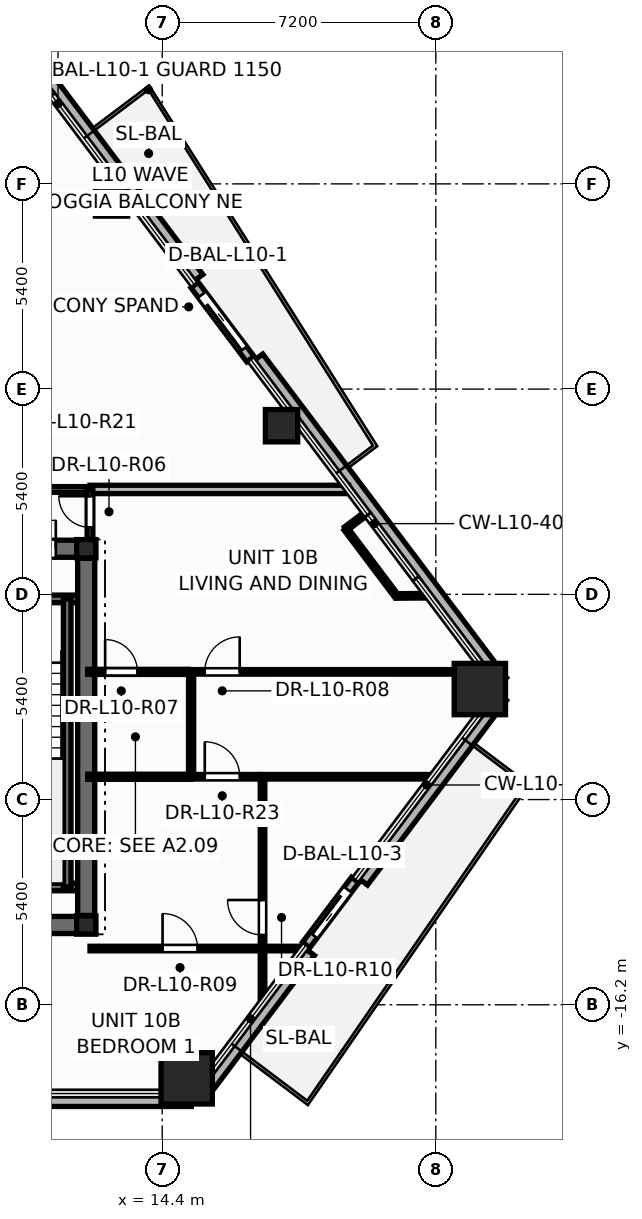
"""IFC4 building model, lengths in metres.
Left out: names, types, materials, properties, quantities, classifications, styles, units other than length and angle.
Written with IfcOpenShell. Run it as: python <this file> out.ifc"""

import sys

from ifc_helpers import new_model, si_unit, direction, frame, frame_2d, origin, origin_2d, place, context, subcontext, project, spatial, rectangle, hollow_rectangle, hollow_circle, i_section, extrude, element, fill, save


model = new_model("IFC4")
c1 = context("Model", 3, precision=1e-05, world=origin(), true_north=direction((0.0, 1.0)))
c2 = subcontext(c1, "Body", "Model", "MODEL_VIEW")
j1 = project(units=[si_unit("LENGTHUNIT", "METRE"), si_unit("PLANEANGLEUNIT", "RADIAN")], contexts=[c1])
p1 = place(None, origin())
s1 = spatial("IfcSite", under=j1, at=p1, CompositionType="ELEMENT")
p2 = place(p1, origin())
s2 = spatial("IfcBuilding", under=s1, at=p2, CompositionType="ELEMENT")
p3 = place(p2, frame((0.0, 0.0, 42.3)))
s3 = spatial("IfcBuildingStorey", under=s2, at=p3, CompositionType="ELEMENT", Elevation=42.3)
for number, where, z_axis, x_axis in (
    (1, (15.044, -18.135, 0.0), (0.0, 0.0, 1.0), (1.0, 0.0, 0.0)),
    (2, (22.759, -7.892, 0.0), (0.0, 0.0, 1.0), (1.0, 0.0, 0.0)),
):
    element("IfcColumn", number, at=place(p3, frame(where, z_axis=z_axis, x_axis=x_axis)), inside=s3, PredefinedType="COLUMN", context=c2, shape_type="SweptSolid", body=[
        extrude(hollow_rectangle(XDim=1.35, YDim=1.35, WallThickness=0.065, at=origin_2d()), origin(), (0.0, 0.0, 1.0), 3.6),
    ])
for number, where, z_axis, x_axis in (
    (3, (17.54, -0.963, 0.0), (0.0, 0.0, 1.0), (1.0, 0.0, 0.0)),
    (4, (13.066, 4.976, 0.0), (0.0, 0.0, 1.0), (1.0, 0.0, 0.0)),
):
    element("IfcColumn", number, at=place(p3, frame(where, z_axis=z_axis, x_axis=x_axis)), inside=s3, PredefinedType="COLUMN", context=c2, shape_type="SweptSolid", body=[
        extrude(hollow_circle(Radius=0.425, WallThickness=0.038, at=origin_2d()), origin(), (0.0, 0.0, 1.0), 3.6),
    ])
for number, where, z_axis, x_axis in (
    (5, (12.4, -14.1, 0.0), (0.0, 0.0, 1.0), (1.0, 0.0, 0.0)),
    (6, (12.4, -4.2, 0.0), (0.0, 0.0, 1.0), (1.0, 0.0, 0.0)),
):
    element("IfcColumn", number, at=place(p3, frame(where, z_axis=z_axis, x_axis=x_axis)), inside=s3, PredefinedType="COLUMN", context=c2, shape_type="SweptSolid", body=[
        extrude(i_section(OverallWidth=0.5, OverallDepth=0.482, WebThickness=0.04, FlangeThickness=0.045, at=origin_2d()), origin(), (0.0, 0.0, 1.0), 3.6),
    ])
p4 = place(p3, frame((-15.163, -18.696, -0.2), z_axis=(0.0, 0.0, 1.0), x_axis=(1.0, 0.0, 0.0)))
e7 = element("IfcWall", 7, at=p4, inside=s3, PredefinedType="PARAPET", context=c2, shape_type="SweptSolid", body=[
    extrude(rectangle(XDim=30.327, YDim=0.36, at=frame_2d((15.163, 0.0))), origin(), (0.0, 0.0, 1.0), 0.38),
])
p5 = place(p3, frame((15.443, -18.536, -0.2), z_axis=(0.0, 0.0, 1.0), x_axis=(0.601658024361, 0.798753792931, 0.0)))
e8 = element("IfcWall", 8, at=p5, inside=s3, PredefinedType="PARAPET", context=c2, shape_type="SweptSolid", body=[
    extrude(rectangle(XDim=4.685, YDim=0.36, at=frame_2d((2.342, 0.0))), origin(), (0.0, 0.0, 1.0), 0.38),
])
p6 = place(p3, frame((19.658, -12.941, -0.2), z_axis=(0.0, 0.0, 1.0), x_axis=(0.601637160859, 0.798769507852, 0.0)))
e9 = element("IfcWall", 9, at=p6, inside=s3, PredefinedType="PARAPET", context=c2, shape_type="SweptSolid", body=[
    extrude(rectangle(XDim=6.08, YDim=0.36, at=frame_2d((3.04, 0.0))), origin(), (0.0, 0.0, 1.0), 0.38),
])
p7 = place(p3, frame((23.315, -7.7, -0.2), z_axis=(0.0, 0.0, 1.0), x_axis=(-0.601640427837, 0.798767047137, 0.0)))
e10 = element("IfcWall", 10, at=p7, inside=s3, PredefinedType="PARAPET", context=c2, shape_type="SweptSolid", body=[
    extrude(rectangle(XDim=10.66, YDim=0.36, at=frame_2d((5.33, 0.0))), origin(), (0.0, 0.0, 1.0), 0.38),
])
p8 = place(p3, frame((15.326, 2.907, -0.2), z_axis=(0.0, 0.0, 1.0), x_axis=(-0.601625447282, 0.798778330441, 0.0)))
e11 = element("IfcWall", 11, at=p8, inside=s3, PredefinedType="PARAPET", context=c2, shape_type="SweptSolid", body=[
    extrude(rectangle(XDim=11.767, YDim=0.36, at=frame_2d((5.883, 0.0))), origin(), (0.0, 0.0, 1.0), 0.38),
])
p9 = place(p3, frame((16.72, 0.79, -0.015), z_axis=(0.0, 0.0, 1.0), x_axis=(-0.601647678338, 0.798761585926, 0.0)))
e12 = element("IfcWall", 12, at=p9, inside=s3, PredefinedType="STANDARD", context=c2, shape_type="SweptSolid", body=[
    extrude(rectangle(XDim=2.44, YDim=0.24, at=frame_2d((1.22, 0.0))), origin(), (0.0, 0.0, 1.0), 2.729),
])
p10 = place(p9, frame((0.32, 0.0, 0.015)))
e13 = element("IfcOpeningElement", 13, at=p10, cuts=e12, PredefinedType="OPENING", context=c2, shape_type="SweptSolid", body=[
    extrude(rectangle(XDim=1.806, YDim=2.204, at=frame_2d((0.9, 1.102))), frame((0.0, 0.13, 0.0), z_axis=(0.0, -1.0, 0.0), x_axis=(1.0, 0.0, 0.0)), (0.0, 0.0, 1.0), 0.26),
])
p11 = place(p3, frame((18.188, -14.626, -0.015), z_axis=(0.0, 0.0, 1.0), x_axis=(0.601623476904, 0.79877981449, 0.0)))
e14 = element("IfcWall", 14, at=p11, inside=s3, PredefinedType="STANDARD", context=c2, shape_type="SweptSolid", body=[
    extrude(rectangle(XDim=2.14, YDim=0.24, at=frame_2d((1.07, 0.0))), origin(), (0.0, 0.0, 1.0), 2.729),
])
p12 = place(p11, frame((0.32, 0.0, 0.015)))
e15 = element("IfcOpeningElement", 15, at=p12, cuts=e14, PredefinedType="OPENING", context=c2, shape_type="SweptSolid", body=[
    extrude(rectangle(XDim=1.506, YDim=2.204, at=frame_2d((0.75, 1.102))), frame((0.0, 0.13, 0.0), z_axis=(0.0, -1.0, 0.0), x_axis=(1.0, 0.0, 0.0)), (0.0, 0.0, 1.0), 0.26),
])
p13 = place(p3, frame((-12.65, -14.1, 0.0), z_axis=(0.0, 0.0, 1.0), x_axis=(1.0, 0.0, 0.0)))
e16 = element("IfcWall", 16, at=p13, inside=s3, PredefinedType="SHEAR", context=c2, shape_type="SweptSolid", body=[
    extrude(rectangle(XDim=25.3, YDim=0.45, at=frame_2d((12.65, 0.0))), origin(), (0.0, 0.0, 1.0), 3.6),
])
p14 = place(p3, frame((-12.65, -4.2, 0.0), z_axis=(0.0, 0.0, 1.0), x_axis=(1.0, 0.0, 0.0)))
e17 = element("IfcWall", 17, at=p14, inside=s3, PredefinedType="SHEAR", context=c2, shape_type="SweptSolid", body=[
    extrude(rectangle(XDim=25.3, YDim=0.45, at=frame_2d((12.65, 0.0))), origin(), (0.0, 0.0, 1.0), 3.6),
])
p15 = place(p14, frame((1.85, 0.0, 0.0)))
e18 = element("IfcOpeningElement", 18, at=p15, cuts=e17, PredefinedType="OPENING", context=c2, shape_type="SweptSolid", body=[
    extrude(rectangle(XDim=0.756, YDim=2.054, at=frame_2d((0.375, 1.027))), frame((0.0, 0.235, 0.0), z_axis=(0.0, -1.0, 0.0), x_axis=(1.0, 0.0, 0.0)), (0.0, 0.0, 1.0), 0.47),
])
p16 = place(p14, frame((21.85, 0.0, 0.0)))
e19 = element("IfcOpeningElement", 19, at=p16, cuts=e17, PredefinedType="OPENING", context=c2, shape_type="SweptSolid", body=[
    extrude(rectangle(XDim=0.756, YDim=2.054, at=frame_2d((0.375, 1.027))), frame((0.0, 0.235, 0.0), z_axis=(0.0, -1.0, 0.0), x_axis=(1.0, 0.0, 0.0)), (0.0, 0.0, 1.0), 0.47),
])
p17 = place(p14, frame((23.5, 0.0, 0.0)))
e20 = element("IfcOpeningElement", 20, at=p17, cuts=e17, PredefinedType="OPENING", context=c2, shape_type="SweptSolid", body=[
    extrude(rectangle(XDim=0.756, YDim=2.054, at=frame_2d((0.375, 1.027))), frame((0.0, 0.235, 0.0), z_axis=(0.0, -1.0, 0.0), x_axis=(1.0, 0.0, 0.0)), (0.0, 0.0, 1.0), 0.47),
])
p18 = place(p14, frame((5.85, 0.0, 0.0)))
e21 = element("IfcOpeningElement", 21, at=p18, cuts=e17, PredefinedType="OPENING", context=c2, shape_type="SweptSolid", body=[
    extrude(rectangle(XDim=1.006, YDim=2.104, at=frame_2d((0.5, 1.052))), frame((0.0, 0.235, 0.0), z_axis=(0.0, -1.0, 0.0), x_axis=(1.0, 0.0, 0.0)), (0.0, 0.0, 1.0), 0.47),
])
p19 = place(p14, frame((10.35, 0.0, 0.0)))
e22 = element("IfcOpeningElement", 22, at=p19, cuts=e17, PredefinedType="OPENING", context=c2, shape_type="SweptSolid", body=[
    extrude(rectangle(XDim=1.406, YDim=2.154, at=frame_2d((0.7, 1.077))), frame((0.0, 0.235, 0.0), z_axis=(0.0, -1.0, 0.0), x_axis=(1.0, 0.0, 0.0)), (0.0, 0.0, 1.0), 0.47),
])
p20 = place(p14, frame((18.45, 0.0, 0.0)))
e23 = element("IfcOpeningElement", 23, at=p20, cuts=e17, PredefinedType="OPENING", context=c2, shape_type="SweptSolid", body=[
    extrude(rectangle(XDim=1.006, YDim=2.104, at=frame_2d((0.5, 1.052))), frame((0.0, 0.235, 0.0), z_axis=(0.0, -1.0, 0.0), x_axis=(1.0, 0.0, 0.0)), (0.0, 0.0, 1.0), 0.47),
])
for number, where, z_axis, x_axis in (
    (24, (8.48, -5.52, 0.0), (0.0, 0.0, 1.0), (1.0, 0.0, 0.0)),
    (25, (8.48, -13.1, 0.0), (0.0, 0.0, 1.0), (1.0, 0.0, 0.0)),
):
    element("IfcWall", number, at=place(p3, frame(where, z_axis=z_axis, x_axis=x_axis)), inside=s3, PredefinedType="SOLIDWALL", context=c2, shape_type="SweptSolid", body=[
        extrude(rectangle(XDim=3.87, YDim=0.2, at=frame_2d((1.935, 0.0))), origin(), (0.0, 0.0, 1.0), 3.6),
    ])
p21 = place(p3, frame((11.9, -13.1, 0.0), z_axis=(0.0, 0.0, 1.0), x_axis=(0.0, 1.0, 0.0)))
e26 = element("IfcWall", 26, at=p21, inside=s3, PredefinedType="SOLIDWALL", context=c2, shape_type="SweptSolid", body=[
    extrude(rectangle(XDim=7.58, YDim=0.2, at=frame_2d((3.79, 0.0))), origin(), (0.0, 0.0, 1.0), 3.6),
])
p22 = place(p3, frame((12.4, -13.85, 0.0), z_axis=(0.0, 0.0, 1.0), x_axis=(0.0, 1.0, 0.0)))
e27 = element("IfcWall", 27, at=p22, inside=s3, PredefinedType="SHEAR", context=c2, shape_type="SweptSolid", body=[
    extrude(rectangle(XDim=9.4, YDim=0.45, at=frame_2d((4.7, 0.0))), origin(), (0.0, 0.0, 1.0), 3.6),
])
p23 = place(p3, frame((15.08, -7.44, 0.0), z_axis=(0.0, 0.0, 1.0), x_axis=(1.0, 0.0, 0.0)))
e28 = element("IfcWall", 28, at=p23, inside=s3, PredefinedType="PARTITIONING", context=c2, shape_type="SweptSolid", body=[
    extrude(rectangle(XDim=7.839, YDim=0.12, at=frame_2d((3.919, 0.0))), origin(), (0.0, 0.0, 1.0), 2.325),
])
p24 = place(p23, frame((0.439, 0.0, 0.0)))
e29 = element("IfcOpeningElement", 29, at=p24, cuts=e28, PredefinedType="OPENING", context=c2, shape_type="SweptSolid", body=[
    extrude(rectangle(XDim=0.926, YDim=2.104, at=frame_2d((0.46, 1.052))), frame((0.0, 0.07, 0.0), z_axis=(0.0, -1.0, 0.0), x_axis=(1.0, 0.0, 0.0)), (0.0, 0.0, 1.0), 0.14),
])
p25 = place(p3, frame((12.5, -2.64, 0.0), z_axis=(0.0, 0.0, 1.0), x_axis=(1.0, 0.0, 0.0)))
e30 = element("IfcWall", 30, at=p25, inside=s3, PredefinedType="PARTITIONING", context=c2, shape_type="SweptSolid", body=[
    extrude(rectangle(XDim=6.804, YDim=0.22, at=frame_2d((3.402, 0.0))), origin(), (0.0, 0.0, 1.0), 2.713),
])
p26 = place(p3, frame((17.04, -16.15, 0.0), z_axis=(0.0, 0.0, 1.0), x_axis=(0.0, 1.0, 0.0)))
e31 = element("IfcWall", 31, at=p26, inside=s3, PredefinedType="PARTITIONING", context=c2, shape_type="SweptSolid", body=[
    extrude(rectangle(XDim=5.95, YDim=0.12, at=frame_2d((2.975, 0.0))), origin(), (0.0, 0.0, 1.0), 2.713),
])
p27 = place(p26, frame((1.788, 0.0, 0.0)))
e32 = element("IfcOpeningElement", 32, at=p27, cuts=e31, PredefinedType="OPENING", context=c2, shape_type="SweptSolid", body=[
    extrude(rectangle(XDim=0.926, YDim=2.104, at=frame_2d((0.46, 1.052))), frame((0.0, 0.07, 0.0), z_axis=(0.0, -1.0, 0.0), x_axis=(1.0, 0.0, 0.0)), (0.0, 0.0, 1.0), 0.14),
])
p28 = place(p3, frame((12.5, -14.72, 0.0), z_axis=(0.0, 0.0, 1.0), x_axis=(1.0, 0.0, 0.0)))
e33 = element("IfcWall", 33, at=p28, inside=s3, PredefinedType="PARTITIONING", context=c2, shape_type="SweptSolid", body=[
    extrude(rectangle(XDim=5.617, YDim=0.12, at=frame_2d((2.809, 0.0))), origin(), (0.0, 0.0, 1.0), 2.713),
])
p29 = place(p28, frame((1.909, 0.0, 0.0)))
e34 = element("IfcOpeningElement", 34, at=p29, cuts=e33, PredefinedType="OPENING", context=c2, shape_type="SweptSolid", body=[
    extrude(rectangle(XDim=0.926, YDim=2.104, at=frame_2d((0.46, 1.052))), frame((0.0, 0.07, 0.0), z_axis=(0.0, -1.0, 0.0), x_axis=(1.0, 0.0, 0.0)), (0.0, 0.0, 1.0), 0.14),
])
p30 = place(p3, frame((16.98, -10.2, 0.0), z_axis=(0.0, 0.0, 1.0), x_axis=(1.0, 0.0, 0.0)))
e35 = element("IfcWall", 35, at=p30, inside=s3, PredefinedType="PARTITIONING", context=c2, shape_type="SweptSolid", body=[
    extrude(rectangle(XDim=4.542, YDim=0.12, at=frame_2d((2.271, 0.0))), origin(), (0.0, 0.0, 1.0), 2.713),
])
p31 = place(p3, frame((9.24, -2.64, 0.0), z_axis=(0.0, 0.0, 1.0), x_axis=(1.0, 0.0, 0.0)))
e36 = element("IfcWall", 36, at=p31, inside=s3, PredefinedType="PARTITIONING", context=c2, shape_type="SweptSolid", body=[
    extrude(rectangle(XDim=3.26, YDim=0.15, at=frame_2d((1.63, 0.0))), origin(), (0.0, 0.0, 1.0), 3.35),
])
p32 = place(p3, frame((12.44, -7.44, 0.0), z_axis=(0.0, 0.0, 1.0), x_axis=(1.0, 0.0, 0.0)))
e37 = element("IfcWall", 37, at=p32, inside=s3, PredefinedType="PARTITIONING", context=c2, shape_type="SweptSolid", body=[
    extrude(rectangle(XDim=2.638, YDim=0.135, at=frame_2d((1.319, 0.0))), origin(), (0.0, 0.0, 1.0), 2.713),
])
p33 = place(p32, frame((0.458, 0.0, 0.0)))
e38 = element("IfcOpeningElement", 38, at=p33, cuts=e37, PredefinedType="OPENING", context=c2, shape_type="SweptSolid", body=[
    extrude(rectangle(XDim=0.856, YDim=2.104, at=frame_2d((0.425, 1.052))), frame((0.0, 0.078, 0.0), z_axis=(0.0, -1.0, 0.0), x_axis=(1.0, 0.0, 0.0)), (0.0, 0.0, 1.0), 0.155),
])
p34 = place(p3, frame((15.16, -10.2, 0.0), z_axis=(0.0, 0.0, 1.0), x_axis=(0.0, 1.0, 0.0)))
e39 = element("IfcWall", 39, at=p34, inside=s3, PredefinedType="PARTITIONING", context=c2, shape_type="SweptSolid", body=[
    extrude(rectangle(XDim=2.76, YDim=0.135, at=frame_2d((1.38, 0.0))), origin(), (0.0, 0.0, 1.0), 3.35),
])
p35 = place(p3, frame((12.44, -10.2, 0.0), z_axis=(0.0, 0.0, 1.0), x_axis=(1.0, 0.0, 0.0)))
e40 = element("IfcWall", 40, at=p35, inside=s3, PredefinedType="PARTITIONING", context=c2, shape_type="SweptSolid", body=[
    extrude(rectangle(XDim=2.72, YDim=0.135, at=frame_2d((1.36, 0.0))), origin(), (0.0, 0.0, 1.0), 2.713),
])
p36 = place(p3, frame((20.563, -5.442, 0.0), z_axis=(0.0, 0.0, 1.0), x_axis=(-0.60167490335, 0.798741078622, 0.0)))
e41 = element("IfcWall", 41, at=p36, inside=s3, PredefinedType="PARTITIONING", context=c2, shape_type="SweptSolid", body=[
    extrude(rectangle(XDim=2.214, YDim=0.12, at=frame_2d((1.107, 0.0))), origin(), (0.0, 0.0, 1.0), 3.35),
])
p37 = place(p3, frame((15.16, -10.2, 0.0), z_axis=(0.0, 0.0, 1.0), x_axis=(1.0, 0.0, 0.0)))
e42 = element("IfcWall", 42, at=p37, inside=s3, PredefinedType="PARTITIONING", context=c2, shape_type="SweptSolid", body=[
    extrude(rectangle(XDim=1.818, YDim=0.12, at=frame_2d((0.909, 0.0))), origin(), (0.0, 0.0, 1.0), 3.35),
])
p38 = place(p37, frame((0.36, 0.0, 0.0)))
e43 = element("IfcOpeningElement", 43, at=p38, cuts=e42, PredefinedType="OPENING", context=c2, shape_type="SweptSolid", body=[
    extrude(rectangle(XDim=0.926, YDim=2.104, at=frame_2d((0.46, 1.052))), frame((0.0, 0.07, 0.0), z_axis=(0.0, -1.0, 0.0), x_axis=(1.0, 0.0, 0.0)), (0.0, 0.0, 1.0), 0.14),
])
p39 = place(p3, frame((12.5, -4.24, 0.0), z_axis=(0.0, 0.0, 1.0), x_axis=(0.0, 1.0, 0.0)))
e44 = element("IfcWall", 44, at=p39, inside=s3, PredefinedType="PARTITIONING", context=c2, shape_type="SweptSolid", body=[
    extrude(rectangle(XDim=1.6, YDim=0.15, at=frame_2d((0.8, 0.0))), origin(), (0.0, 0.0, 1.0), 2.325),
])
p40 = place(p39, frame((0.602, 0.0, 0.0)))
e45 = element("IfcOpeningElement", 45, at=p40, cuts=e44, PredefinedType="OPENING", context=c2, shape_type="SweptSolid", body=[
    extrude(rectangle(XDim=0.826, YDim=2.104, at=frame_2d((0.41, 1.052))), frame((0.0, 0.085, 0.0), z_axis=(0.0, -1.0, 0.0), x_axis=(1.0, 0.0, 0.0)), (0.0, 0.0, 1.0), 0.17),
])
p41 = place(p3, frame((21.397, -5.436, 0.0), z_axis=(0.0, 0.0, 1.0), x_axis=(-0.999971035762, -0.007611020764, 0.0)))
e46 = element("IfcWall", 46, at=p41, inside=s3, PredefinedType="PARTITIONING", context=c2, shape_type="SweptSolid", body=[
    extrude(rectangle(XDim=0.834, YDim=0.12, at=frame_2d((0.417, 0.0))), origin(), (0.0, 0.0, 1.0), 2.713),
])
p42 = place(p3, frame((11.518, 7.68, 0.0), z_axis=(0.0, 0.0, 1.0), x_axis=(-0.798773936271, -0.601631281379, 0.0)))
e47 = element("IfcWall", 47, at=p42, inside=s3, PredefinedType="PARTITIONING", context=c2, shape_type="SweptSolid", body=[
    extrude(rectangle(XDim=0.67, YDim=0.12, at=frame_2d((0.335, 0.0))), origin(), (0.0, 0.0, 1.0), 2.713),
])
p43 = place(p3, frame((19.231, -3.674, 0.0), z_axis=(0.0, 0.0, 1.0), x_axis=(0.798905778506, 0.601456197133, 0.0)))
e48 = element("IfcWall", 48, at=p43, inside=s3, PredefinedType="PARTITIONING", context=c2, shape_type="SweptSolid", body=[
    extrude(rectangle(XDim=0.67, YDim=0.12, at=frame_2d((0.335, 0.0))), origin(), (0.0, 0.0, 1.0), 2.713),
])
p44 = place(p10, origin())
e49 = element("IfcDoor", 49, at=p44, inside=s3, OperationType="SLIDING_TO_LEFT", PredefinedType="DOOR", context=c2, shape_type="SweptSolid", body=[
    extrude(rectangle(XDim=1.8, YDim=2.2, at=frame_2d((0.9, 1.1))), frame((0.0, 0.025, 0.0), z_axis=(0.0, -1.0, 0.0), x_axis=(1.0, 0.0, 0.0)), (0.0, 0.0, 1.0), 0.05),
])
fill(e13, e49)
p45 = place(p12, origin())
e50 = element("IfcDoor", 50, at=p45, inside=s3, OperationType="SLIDING_TO_RIGHT", PredefinedType="DOOR", context=c2, shape_type="SweptSolid", body=[
    extrude(rectangle(XDim=1.5, YDim=2.2, at=frame_2d((0.75, 1.1))), frame((0.0, 0.025, 0.0), z_axis=(0.0, -1.0, 0.0), x_axis=(1.0, 0.0, 0.0)), (0.0, 0.0, 1.0), 0.05),
])
fill(e15, e50)
p46 = place(p17, origin())
e51 = element("IfcDoor", 51, at=p46, inside=s3, OperationType="SINGLE_SWING_RIGHT", PredefinedType="DOOR", context=c2, shape_type="SweptSolid", body=[
    extrude(rectangle(XDim=0.75, YDim=2.05, at=frame_2d((0.375, 1.025))), frame((0.0, 0.025, 0.0), z_axis=(0.0, -1.0, 0.0), x_axis=(1.0, 0.0, 0.0)), (0.0, 0.0, 1.0), 0.05),
])
fill(e20, e51)
p47 = place(p40, origin())
e52 = element("IfcDoor", 52, at=p47, inside=s3, OperationType="SINGLE_SWING_RIGHT", PredefinedType="DOOR", context=c2, shape_type="SweptSolid", body=[
    extrude(rectangle(XDim=0.82, YDim=2.1, at=frame_2d((0.41, 1.05))), frame((0.0, 0.025, 0.0), z_axis=(0.0, -1.0, 0.0), x_axis=(1.0, 0.0, 0.0)), (0.0, 0.0, 1.0), 0.05),
])
fill(e45, e52)
p48 = place(p33, origin())
e53 = element("IfcDoor", 53, at=p48, inside=s3, OperationType="SINGLE_SWING_LEFT", PredefinedType="DOOR", context=c2, shape_type="SweptSolid", body=[
    extrude(rectangle(XDim=0.85, YDim=2.1, at=frame_2d((0.425, 1.05))), frame((0.0, 0.025, 0.0), z_axis=(0.0, -1.0, 0.0), x_axis=(1.0, 0.0, 0.0)), (0.0, 0.0, 1.0), 0.05),
])
fill(e38, e53)
p49 = place(p24, origin())
e54 = element("IfcDoor", 54, at=p49, inside=s3, OperationType="SINGLE_SWING_RIGHT", PredefinedType="DOOR", context=c2, shape_type="SweptSolid", body=[
    extrude(rectangle(XDim=0.92, YDim=2.1, at=frame_2d((0.46, 1.05))), frame((0.0, 0.025, 0.0), z_axis=(0.0, -1.0, 0.0), x_axis=(1.0, 0.0, 0.0)), (0.0, 0.0, 1.0), 0.05),
])
fill(e29, e54)
p50 = place(p29, origin())
e55 = element("IfcDoor", 55, at=p50, inside=s3, OperationType="SINGLE_SWING_LEFT", PredefinedType="DOOR", context=c2, shape_type="SweptSolid", body=[
    extrude(rectangle(XDim=0.92, YDim=2.1, at=frame_2d((0.46, 1.05))), frame((0.0, 0.025, 0.0), z_axis=(0.0, -1.0, 0.0), x_axis=(1.0, 0.0, 0.0)), (0.0, 0.0, 1.0), 0.05),
])
fill(e34, e55)
p51 = place(p27, origin())
e56 = element("IfcDoor", 56, at=p51, inside=s3, OperationType="SINGLE_SWING_RIGHT", PredefinedType="DOOR", context=c2, shape_type="SweptSolid", body=[
    extrude(rectangle(XDim=0.92, YDim=2.1, at=frame_2d((0.46, 1.05))), frame((0.0, 0.025, 0.0), z_axis=(0.0, -1.0, 0.0), x_axis=(1.0, 0.0, 0.0)), (0.0, 0.0, 1.0), 0.05),
])
fill(e32, e56)
p52 = place(p38, origin())
e57 = element("IfcDoor", 57, at=p52, inside=s3, OperationType="SINGLE_SWING_LEFT", PredefinedType="DOOR", context=c2, shape_type="SweptSolid", body=[
    extrude(rectangle(XDim=0.92, YDim=2.1, at=frame_2d((0.46, 1.05))), frame((0.0, 0.025, 0.0), z_axis=(0.0, -1.0, 0.0), x_axis=(1.0, 0.0, 0.0)), (0.0, 0.0, 1.0), 0.05),
])
fill(e43, e57)
save(model, sys.argv[1])
